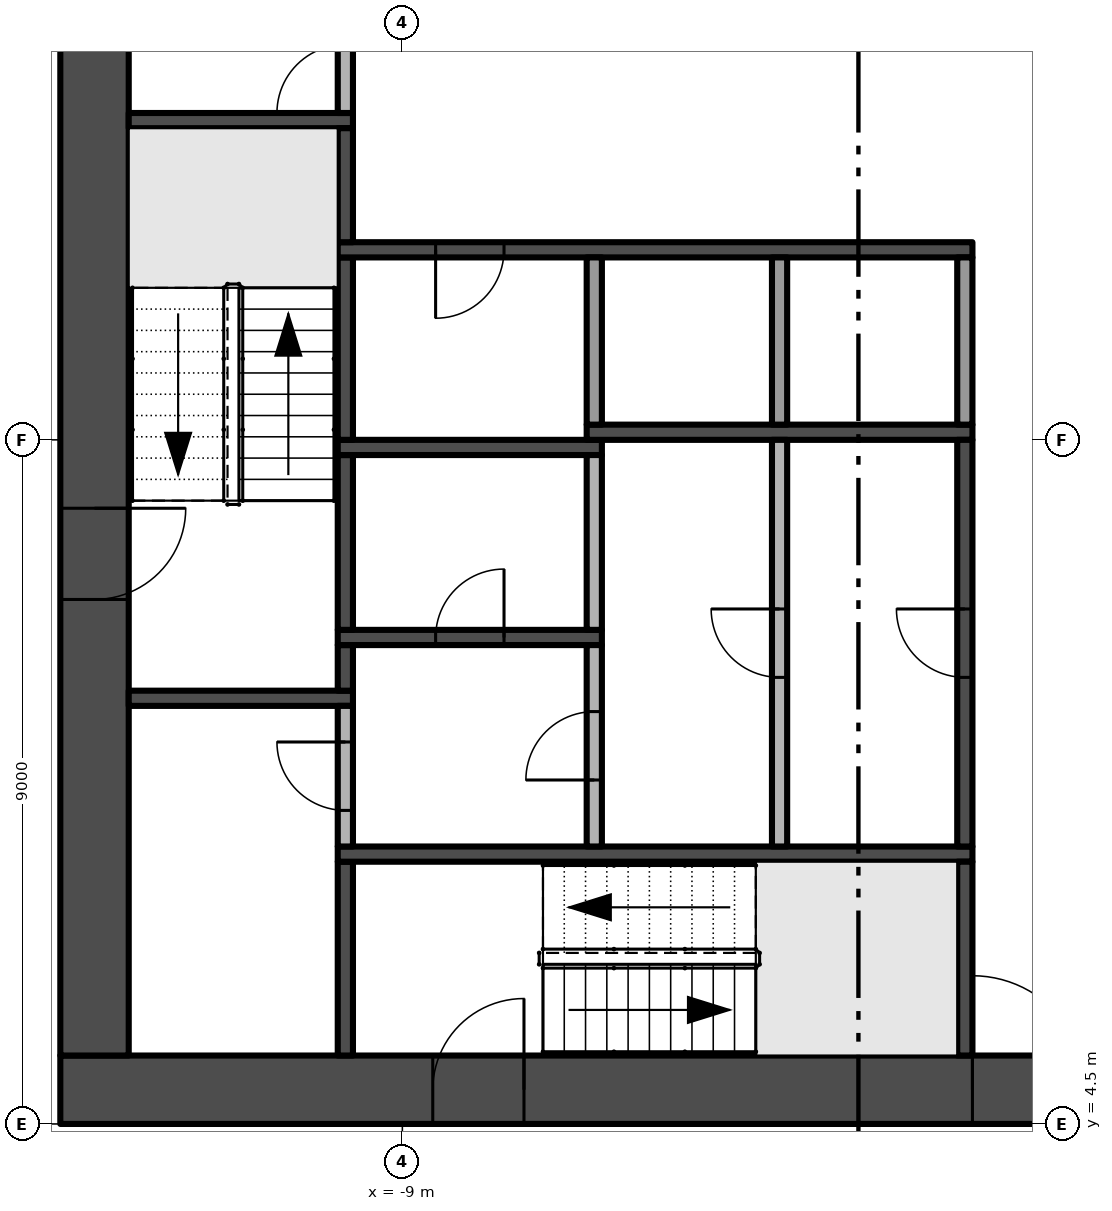
"""IFC4 building model, lengths in metres.
Left out: names, types, materials, properties, quantities, classifications, styles, units other than length and angle.
Written with IfcOpenShell. Run it as: python <this file> out.ifc"""

import sys

from ifc_helpers import new_model, si_unit, direction, frame, frame_2d, origin, place, context, subcontext, project, spatial, rectangle, extrude, element, fill, save


model = new_model("IFC4")
c1 = context("Model", 3, precision=1e-05, world=origin(), true_north=direction((0.0, 1.0)))
c2 = subcontext(c1, "Body", "Model", "MODEL_VIEW")
j1 = project(units=[si_unit("LENGTHUNIT", "METRE"), si_unit("PLANEANGLEUNIT", "RADIAN")], contexts=[c1])
p1 = place(None, origin())
s1 = spatial("IfcSite", under=j1, at=p1, CompositionType="ELEMENT")
p2 = place(p1, origin())
s2 = spatial("IfcBuilding", under=s1, at=p2, CompositionType="ELEMENT")
p3 = place(p2, frame((0.0, 0.0, 80.8)))
s3 = spatial("IfcBuildingStorey", under=s2, at=p3, CompositionType="ELEMENT", Elevation=80.8)
p4 = place(p3, frame((-13.5, 4.95, -0.3), z_axis=(0.0, 0.0, 1.0), x_axis=(1.0, 0.0, 0.0)))
e1 = element("IfcWall", 1, at=p4, inside=s3, PredefinedType="SHEAR", context=c2, shape_type="SweptSolid", body=[
    extrude(rectangle(XDim=27.0, YDim=0.9, at=frame_2d((13.5, 0.0))), origin(), (0.0, 0.0, 1.0), 3.8),
])
p5 = place(p4, frame((12.0, 0.0, 0.3)))
e2 = element("IfcOpeningElement", 2, at=p5, cuts=e1, PredefinedType="OPENING", context=c2, shape_type="SweptSolid", body=[
    extrude(rectangle(XDim=3.0, YDim=2.4, at=frame_2d((1.5, 1.2))), frame((0.0, 0.46, 0.0), z_axis=(0.0, -1.0, 0.0), x_axis=(1.0, 0.0, 0.0)), (0.0, 0.0, 1.0), 0.92),
])
p6 = place(p4, frame((4.9, 0.0, 0.3)))
e3 = element("IfcOpeningElement", 3, at=p6, cuts=e1, PredefinedType="OPENING", context=c2, shape_type="SweptSolid", body=[
    extrude(rectangle(XDim=1.2, YDim=2.2, at=frame_2d((0.6, 1.1))), frame((0.0, 0.46, 0.0), z_axis=(0.0, -1.0, 0.0), x_axis=(1.0, 0.0, 0.0)), (0.0, 0.0, 1.0), 0.92),
])
p7 = place(p4, frame((20.75, 0.0, 0.3)))
e4 = element("IfcOpeningElement", 4, at=p7, cuts=e1, PredefinedType="OPENING", context=c2, shape_type="SweptSolid", body=[
    extrude(rectangle(XDim=1.5, YDim=2.2, at=frame_2d((0.75, 1.1))), frame((0.0, 0.46, 0.0), z_axis=(0.0, -1.0, 0.0), x_axis=(1.0, 0.0, 0.0)), (0.0, 0.0, 1.0), 0.92),
])
p8 = place(p4, frame((17.4, 0.0, 0.3)))
e5 = element("IfcOpeningElement", 5, at=p8, cuts=e1, PredefinedType="OPENING", context=c2, shape_type="SweptSolid", body=[
    extrude(rectangle(XDim=1.2, YDim=2.2, at=frame_2d((0.6, 1.1))), frame((0.0, 0.46, 0.0), z_axis=(0.0, -1.0, 0.0), x_axis=(1.0, 0.0, 0.0)), (0.0, 0.0, 1.0), 0.92),
])
p9 = place(p3, frame((-13.05, 21.6, -0.3), z_axis=(0.0, 0.0, 1.0), x_axis=(0.0, -1.0, 0.0)))
e6 = element("IfcWall", 6, at=p9, inside=s3, PredefinedType="SHEAR", context=c2, shape_type="SweptSolid", body=[
    extrude(rectangle(XDim=16.2, YDim=0.9, at=frame_2d((8.1, 0.0))), origin(), (0.0, 0.0, 1.0), 3.8),
])
p10 = place(p9, frame((9.0, 0.0, 0.3)))
e7 = element("IfcOpeningElement", 7, at=p10, cuts=e6, PredefinedType="OPENING", context=c2, shape_type="SweptSolid", body=[
    extrude(rectangle(XDim=1.2, YDim=2.2, at=frame_2d((0.6, 1.1))), frame((0.0, 0.46, 0.0), z_axis=(0.0, -1.0, 0.0), x_axis=(1.0, 0.0, 0.0)), (0.0, 0.0, 1.0), 0.92),
])
for number, where, z_axis, x_axis in (
    (8, (-12.6, 10.1, 0.0), (0.0, 0.0, 1.0), (1.0, 0.0, 0.0)),
    (9, (-12.6, 17.7, 0.0), (0.0, 0.0, 1.0), (1.0, 0.0, 0.0)),
):
    element("IfcWall", number, at=place(p3, frame(where, z_axis=z_axis, x_axis=x_axis)), inside=s3, PredefinedType="SHEAR", context=c2, shape_type="SweptSolid", body=[
        extrude(rectangle(XDim=2.95, YDim=0.2, at=frame_2d((1.475, 0.0))), origin(), (0.0, 0.0, 1.0), 3.5),
    ])
p11 = place(p3, frame((-9.75, 5.4, 0.0), z_axis=(0.0, 0.0, 1.0), x_axis=(0.0, 1.0, 0.0)))
e10 = element("IfcWall", 10, at=p11, inside=s3, PredefinedType="SHEAR", context=c2, shape_type="SweptSolid", body=[
    extrude(rectangle(XDim=2.55, YDim=0.2, at=frame_2d((1.275, 0.0))), origin(), (0.0, 0.0, 1.0), 3.5),
])
p12 = place(p3, frame((-9.85, 8.05, 0.0), z_axis=(0.0, 0.0, 1.0), x_axis=(1.0, 0.0, 0.0)))
e11 = element("IfcWall", 11, at=p12, inside=s3, PredefinedType="SHEAR", context=c2, shape_type="SweptSolid", body=[
    extrude(rectangle(XDim=8.35, YDim=0.2, at=frame_2d((4.175, 0.0))), origin(), (0.0, 0.0, 1.0), 3.5),
])
p13 = place(p3, frame((-9.75, 8.15, 0.0), z_axis=(0.0, 0.0, 1.0), x_axis=(0.0, 1.0, 0.0)))
e12 = element("IfcWall", 12, at=p13, inside=s3, PredefinedType="PARTITIONING", context=c2, shape_type="SweptSolid", body=[
    extrude(rectangle(XDim=1.85, YDim=0.2, at=frame_2d((0.925, 0.0))), origin(), (0.0, 0.0, 1.0), 3.5),
])
p14 = place(p13, frame((0.475, 0.0, 0.0)))
e13 = element("IfcOpeningElement", 13, at=p14, cuts=e12, PredefinedType="OPENING", context=c2, shape_type="SweptSolid", body=[
    extrude(rectangle(XDim=0.9, YDim=2.1, at=frame_2d((0.45, 1.05))), frame((0.0, 0.11, 0.0), z_axis=(0.0, -1.0, 0.0), x_axis=(1.0, 0.0, 0.0)), (0.0, 0.0, 1.0), 0.22),
])
p15 = place(p3, frame((-9.75, 10.2, 0.0), z_axis=(0.0, 0.0, 1.0), x_axis=(0.0, 1.0, 0.0)))
e14 = element("IfcWall", 14, at=p15, inside=s3, PredefinedType="SHEAR", context=c2, shape_type="SweptSolid", body=[
    extrude(rectangle(XDim=0.6, YDim=0.2, at=frame_2d((0.3, 0.0))), origin(), (0.0, 0.0, 1.0), 3.5),
])
p16 = place(p3, frame((-9.85, 10.9, 0.0), z_axis=(0.0, 0.0, 1.0), x_axis=(1.0, 0.0, 0.0)))
e15 = element("IfcWall", 15, at=p16, inside=s3, PredefinedType="SHEAR", context=c2, shape_type="SweptSolid", body=[
    extrude(rectangle(XDim=3.475, YDim=0.2, at=frame_2d((1.738, 0.0))), origin(), (0.0, 0.0, 1.0), 3.5),
])
p17 = place(p16, frame((1.288, 0.0, 0.0)))
e16 = element("IfcOpeningElement", 16, at=p17, cuts=e15, PredefinedType="OPENING", context=c2, shape_type="SweptSolid", body=[
    extrude(rectangle(XDim=0.9, YDim=2.1, at=frame_2d((0.45, 1.05))), frame((0.0, 0.11, 0.0), z_axis=(0.0, -1.0, 0.0), x_axis=(1.0, 0.0, 0.0)), (0.0, 0.0, 1.0), 0.22),
])
p18 = place(p3, frame((-9.75, 11.0, 0.0), z_axis=(0.0, 0.0, 1.0), x_axis=(0.0, 1.0, 0.0)))
e17 = element("IfcWall", 17, at=p18, inside=s3, PredefinedType="SHEAR", context=c2, shape_type="SweptSolid", body=[
    extrude(rectangle(XDim=2.3, YDim=0.2, at=frame_2d((1.15, 0.0))), origin(), (0.0, 0.0, 1.0), 3.5),
])
p19 = place(p3, frame((-9.85, 13.4, 0.0), z_axis=(0.0, 0.0, 1.0), x_axis=(1.0, 0.0, 0.0)))
e18 = element("IfcWall", 18, at=p19, inside=s3, PredefinedType="SHEAR", context=c2, shape_type="SweptSolid", body=[
    extrude(rectangle(XDim=3.475, YDim=0.2, at=frame_2d((1.738, 0.0))), origin(), (0.0, 0.0, 1.0), 3.5),
])
p20 = place(p3, frame((-9.75, 13.5, 0.0), z_axis=(0.0, 0.0, 1.0), x_axis=(0.0, 1.0, 0.0)))
e19 = element("IfcWall", 19, at=p20, inside=s3, PredefinedType="SHEAR", context=c2, shape_type="SweptSolid", body=[
    extrude(rectangle(XDim=2.4, YDim=0.2, at=frame_2d((1.2, 0.0))), origin(), (0.0, 0.0, 1.0), 3.5),
])
p21 = place(p3, frame((-1.5, 16.0, 0.0), z_axis=(0.0, 0.0, 1.0), x_axis=(-1.0, 0.0, 0.0)))
e20 = element("IfcWall", 20, at=p21, inside=s3, PredefinedType="SHEAR", context=c2, shape_type="SweptSolid", body=[
    extrude(rectangle(XDim=8.35, YDim=0.2, at=frame_2d((4.175, 0.0))), origin(), (0.0, 0.0, 1.0), 3.5),
])
p22 = place(p21, frame((6.162, 0.0, 0.0)))
e21 = element("IfcOpeningElement", 21, at=p22, cuts=e20, PredefinedType="OPENING", context=c2, shape_type="SweptSolid", body=[
    extrude(rectangle(XDim=0.9, YDim=2.1, at=frame_2d((0.45, 1.05))), frame((0.0, 0.11, 0.0), z_axis=(0.0, -1.0, 0.0), x_axis=(1.0, 0.0, 0.0)), (0.0, 0.0, 1.0), 0.22),
])
p23 = place(p3, frame((-9.75, 16.1, 0.0), z_axis=(0.0, 0.0, 1.0), x_axis=(0.0, 1.0, 0.0)))
e22 = element("IfcWall", 22, at=p23, inside=s3, PredefinedType="SHEAR", context=c2, shape_type="SweptSolid", body=[
    extrude(rectangle(XDim=1.5, YDim=0.2, at=frame_2d((0.75, 0.0))), origin(), (0.0, 0.0, 1.0), 3.5),
])
p24 = place(p3, frame((-9.75, 17.8, 0.0), z_axis=(0.0, 0.0, 1.0), x_axis=(0.0, 1.0, 0.0)))
e23 = element("IfcWall", 23, at=p24, inside=s3, PredefinedType="PARTITIONING", context=c2, shape_type="SweptSolid", body=[
    extrude(rectangle(XDim=1.4, YDim=0.2, at=frame_2d((0.7, 0.0))), origin(), (0.0, 0.0, 1.0), 3.5),
])
p25 = place(p24, origin())
e24 = element("IfcOpeningElement", 24, at=p25, cuts=e23, PredefinedType="OPENING", context=c2, shape_type="SweptSolid", body=[
    extrude(rectangle(XDim=0.9, YDim=2.1, at=frame_2d((0.45, 1.05))), frame((0.0, 0.11, 0.0), z_axis=(0.0, -1.0, 0.0), x_axis=(1.0, 0.0, 0.0)), (0.0, 0.0, 1.0), 0.22),
])
p26 = place(p3, frame((-6.475, 8.15, 0.0), z_axis=(0.0, 0.0, 1.0), x_axis=(0.0, 1.0, 0.0)))
e25 = element("IfcWall", 25, at=p26, inside=s3, PredefinedType="PARTITIONING", context=c2, shape_type="SweptSolid", body=[
    extrude(rectangle(XDim=2.65, YDim=0.2, at=frame_2d((1.325, 0.0))), origin(), (0.0, 0.0, 1.0), 3.5),
])
p27 = place(p26, frame((0.875, 0.0, 0.0)))
e26 = element("IfcOpeningElement", 26, at=p27, cuts=e25, PredefinedType="OPENING", context=c2, shape_type="SweptSolid", body=[
    extrude(rectangle(XDim=0.9, YDim=2.1, at=frame_2d((0.45, 1.05))), frame((0.0, 0.11, 0.0), z_axis=(0.0, -1.0, 0.0), x_axis=(1.0, 0.0, 0.0)), (0.0, 0.0, 1.0), 0.22),
])
p28 = place(p3, frame((-6.475, 11.0, 0.0), z_axis=(0.0, 0.0, 1.0), x_axis=(0.0, 1.0, 0.0)))
e27 = element("IfcWall", 27, at=p28, inside=s3, PredefinedType="PARTITIONING", context=c2, shape_type="SweptSolid", body=[
    extrude(rectangle(XDim=2.3, YDim=0.2, at=frame_2d((1.15, 0.0))), origin(), (0.0, 0.0, 1.0), 3.5),
])
p29 = place(p3, frame((-6.575, 13.6, 0.0), z_axis=(0.0, 0.0, 1.0), x_axis=(1.0, 0.0, 0.0)))
e28 = element("IfcWall", 28, at=p29, inside=s3, PredefinedType="SHEAR", context=c2, shape_type="SweptSolid", body=[
    extrude(rectangle(XDim=5.075, YDim=0.2, at=frame_2d((2.538, 0.0))), origin(), (0.0, 0.0, 1.0), 3.5),
])
p30 = place(p3, frame((-6.475, 13.7, 0.0), z_axis=(0.0, 0.0, 1.0), x_axis=(0.0, 1.0, 0.0)))
e29 = element("IfcWall", 29, at=p30, inside=s3, PredefinedType="PARTITIONING", context=c2, shape_type="SweptSolid", body=[
    extrude(rectangle(XDim=2.2, YDim=0.2, at=frame_2d((1.1, 0.0))), origin(), (0.0, 0.0, 1.0), 3.5),
])
p31 = place(p3, frame((-4.037, 8.15, 0.0), z_axis=(0.0, 0.0, 1.0), x_axis=(0.0, 1.0, 0.0)))
e30 = element("IfcWall", 30, at=p31, inside=s3, PredefinedType="PARTITIONING", context=c2, shape_type="SweptSolid", body=[
    extrude(rectangle(XDim=5.35, YDim=0.2, at=frame_2d((2.675, 0.0))), origin(), (0.0, 0.0, 1.0), 3.5),
])
p32 = place(p31, frame((2.225, 0.0, 0.0)))
e31 = element("IfcOpeningElement", 31, at=p32, cuts=e30, PredefinedType="OPENING", context=c2, shape_type="SweptSolid", body=[
    extrude(rectangle(XDim=0.9, YDim=2.1, at=frame_2d((0.45, 1.05))), frame((0.0, 0.11, 0.0), z_axis=(0.0, -1.0, 0.0), x_axis=(1.0, 0.0, 0.0)), (0.0, 0.0, 1.0), 0.22),
])
p33 = place(p3, frame((-4.037, 13.7, 0.0), z_axis=(0.0, 0.0, 1.0), x_axis=(0.0, 1.0, 0.0)))
e32 = element("IfcWall", 32, at=p33, inside=s3, PredefinedType="PARTITIONING", context=c2, shape_type="SweptSolid", body=[
    extrude(rectangle(XDim=2.2, YDim=0.2, at=frame_2d((1.1, 0.0))), origin(), (0.0, 0.0, 1.0), 3.5),
])
p34 = place(p3, frame((-1.6, 5.4, 0.0), z_axis=(0.0, 0.0, 1.0), x_axis=(0.0, 1.0, 0.0)))
e33 = element("IfcWall", 33, at=p34, inside=s3, PredefinedType="SHEAR", context=c2, shape_type="SweptSolid", body=[
    extrude(rectangle(XDim=2.55, YDim=0.2, at=frame_2d((1.275, 0.0))), origin(), (0.0, 0.0, 1.0), 3.5),
])
p35 = place(p3, frame((-1.6, 8.15, 0.0), z_axis=(0.0, 0.0, 1.0), x_axis=(0.0, 1.0, 0.0)))
e34 = element("IfcWall", 34, at=p35, inside=s3, PredefinedType="SHEAR", context=c2, shape_type="SweptSolid", body=[
    extrude(rectangle(XDim=5.35, YDim=0.2, at=frame_2d((2.675, 0.0))), origin(), (0.0, 0.0, 1.0), 3.5),
])
p36 = place(p35, frame((2.225, 0.0, 0.0)))
e35 = element("IfcOpeningElement", 35, at=p36, cuts=e34, PredefinedType="OPENING", context=c2, shape_type="SweptSolid", body=[
    extrude(rectangle(XDim=0.9, YDim=2.1, at=frame_2d((0.45, 1.05))), frame((0.0, 0.11, 0.0), z_axis=(0.0, -1.0, 0.0), x_axis=(1.0, 0.0, 0.0)), (0.0, 0.0, 1.0), 0.22),
])
p37 = place(p3, frame((-1.6, 13.7, 0.0), z_axis=(0.0, 0.0, 1.0), x_axis=(0.0, 1.0, 0.0)))
e36 = element("IfcWall", 36, at=p37, inside=s3, PredefinedType="PARTITIONING", context=c2, shape_type="SweptSolid", body=[
    extrude(rectangle(XDim=2.2, YDim=0.2, at=frame_2d((1.1, 0.0))), origin(), (0.0, 0.0, 1.0), 3.5),
])
p38 = place(p5, frame((3.0, 0.0, 0.0), z_axis=(0.0, 0.0, 1.0), x_axis=(-1.0, 0.0, 0.0)))
e37 = element("IfcDoor", 37, at=p38, inside=s3, OperationType="DOUBLE_DOOR_SINGLE_SWING", PredefinedType="DOOR", context=c2, shape_type="SweptSolid", body=[
    extrude(rectangle(XDim=3.0, YDim=2.4, at=frame_2d((1.5, 1.2))), frame((0.0, 0.025, 0.0), z_axis=(0.0, -1.0, 0.0), x_axis=(1.0, 0.0, 0.0)), (0.0, 0.0, 1.0), 0.05),
])
fill(e2, e37)
p39 = place(p10, frame((1.2, 0.0, 0.0), z_axis=(0.0, 0.0, 1.0), x_axis=(-1.0, 0.0, 0.0)))
e38 = element("IfcDoor", 38, at=p39, inside=s3, OperationType="SINGLE_SWING_RIGHT", PredefinedType="DOOR", context=c2, shape_type="SweptSolid", body=[
    extrude(rectangle(XDim=1.2, YDim=2.2, at=frame_2d((0.6, 1.1))), frame((0.0, 0.025, 0.0), z_axis=(0.0, -1.0, 0.0), x_axis=(1.0, 0.0, 0.0)), (0.0, 0.0, 1.0), 0.05),
])
fill(e7, e38)
p40 = place(p6, frame((1.2, 0.0, 0.0), z_axis=(0.0, 0.0, 1.0), x_axis=(-1.0, 0.0, 0.0)))
e39 = element("IfcDoor", 39, at=p40, inside=s3, OperationType="SINGLE_SWING_LEFT", PredefinedType="DOOR", context=c2, shape_type="SweptSolid", body=[
    extrude(rectangle(XDim=1.2, YDim=2.2, at=frame_2d((0.6, 1.1))), frame((0.0, 0.025, 0.0), z_axis=(0.0, -1.0, 0.0), x_axis=(1.0, 0.0, 0.0)), (0.0, 0.0, 1.0), 0.05),
])
fill(e3, e39)
p41 = place(p22, origin())
e40 = element("IfcDoor", 40, at=p41, inside=s3, OperationType="SINGLE_SWING_RIGHT", PredefinedType="DOOR", context=c2, shape_type="SweptSolid", body=[
    extrude(rectangle(XDim=0.9, YDim=2.1, at=frame_2d((0.45, 1.05))), frame((0.0, 0.025, 0.0), z_axis=(0.0, -1.0, 0.0), x_axis=(1.0, 0.0, 0.0)), (0.0, 0.0, 1.0), 0.05),
])
fill(e21, e40)
p42 = place(p36, origin())
e41 = element("IfcDoor", 41, at=p42, inside=s3, OperationType="SINGLE_SWING_RIGHT", PredefinedType="DOOR", context=c2, shape_type="SweptSolid", body=[
    extrude(rectangle(XDim=0.9, YDim=2.1, at=frame_2d((0.45, 1.05))), frame((0.0, 0.025, 0.0), z_axis=(0.0, -1.0, 0.0), x_axis=(1.0, 0.0, 0.0)), (0.0, 0.0, 1.0), 0.05),
])
fill(e35, e41)
p43 = place(p25, origin())
e42 = element("IfcDoor", 42, at=p43, inside=s3, OperationType="SINGLE_SWING_LEFT", PredefinedType="DOOR", context=c2, shape_type="SweptSolid", body=[
    extrude(rectangle(XDim=0.9, YDim=2.1, at=frame_2d((0.45, 1.05))), frame((0.0, 0.025, 0.0), z_axis=(0.0, -1.0, 0.0), x_axis=(1.0, 0.0, 0.0)), (0.0, 0.0, 1.0), 0.05),
])
fill(e24, e42)
p44 = place(p32, origin())
e43 = element("IfcDoor", 43, at=p44, inside=s3, OperationType="SINGLE_SWING_RIGHT", PredefinedType="DOOR", context=c2, shape_type="SweptSolid", body=[
    extrude(rectangle(XDim=0.9, YDim=2.1, at=frame_2d((0.45, 1.05))), frame((0.0, 0.025, 0.0), z_axis=(0.0, -1.0, 0.0), x_axis=(1.0, 0.0, 0.0)), (0.0, 0.0, 1.0), 0.05),
])
fill(e31, e43)
p45 = place(p27, origin())
e44 = element("IfcDoor", 44, at=p45, inside=s3, OperationType="SINGLE_SWING_LEFT", PredefinedType="DOOR", context=c2, shape_type="SweptSolid", body=[
    extrude(rectangle(XDim=0.9, YDim=2.1, at=frame_2d((0.45, 1.05))), frame((0.0, 0.025, 0.0), z_axis=(0.0, -1.0, 0.0), x_axis=(1.0, 0.0, 0.0)), (0.0, 0.0, 1.0), 0.05),
])
fill(e26, e44)
p46 = place(p17, origin())
e45 = element("IfcDoor", 45, at=p46, inside=s3, OperationType="SINGLE_SWING_RIGHT", PredefinedType="DOOR", context=c2, shape_type="SweptSolid", body=[
    extrude(rectangle(XDim=0.9, YDim=2.1, at=frame_2d((0.45, 1.05))), frame((0.0, 0.025, 0.0), z_axis=(0.0, -1.0, 0.0), x_axis=(1.0, 0.0, 0.0)), (0.0, 0.0, 1.0), 0.05),
])
fill(e16, e45)
p47 = place(p14, origin())
e46 = element("IfcDoor", 46, at=p47, inside=s3, OperationType="SINGLE_SWING_RIGHT", PredefinedType="DOOR", context=c2, shape_type="SweptSolid", body=[
    extrude(rectangle(XDim=0.9, YDim=2.1, at=frame_2d((0.45, 1.05))), frame((0.0, 0.025, 0.0), z_axis=(0.0, -1.0, 0.0), x_axis=(1.0, 0.0, 0.0)), (0.0, 0.0, 1.0), 0.05),
])
fill(e13, e46)
save(model, sys.argv[1])
